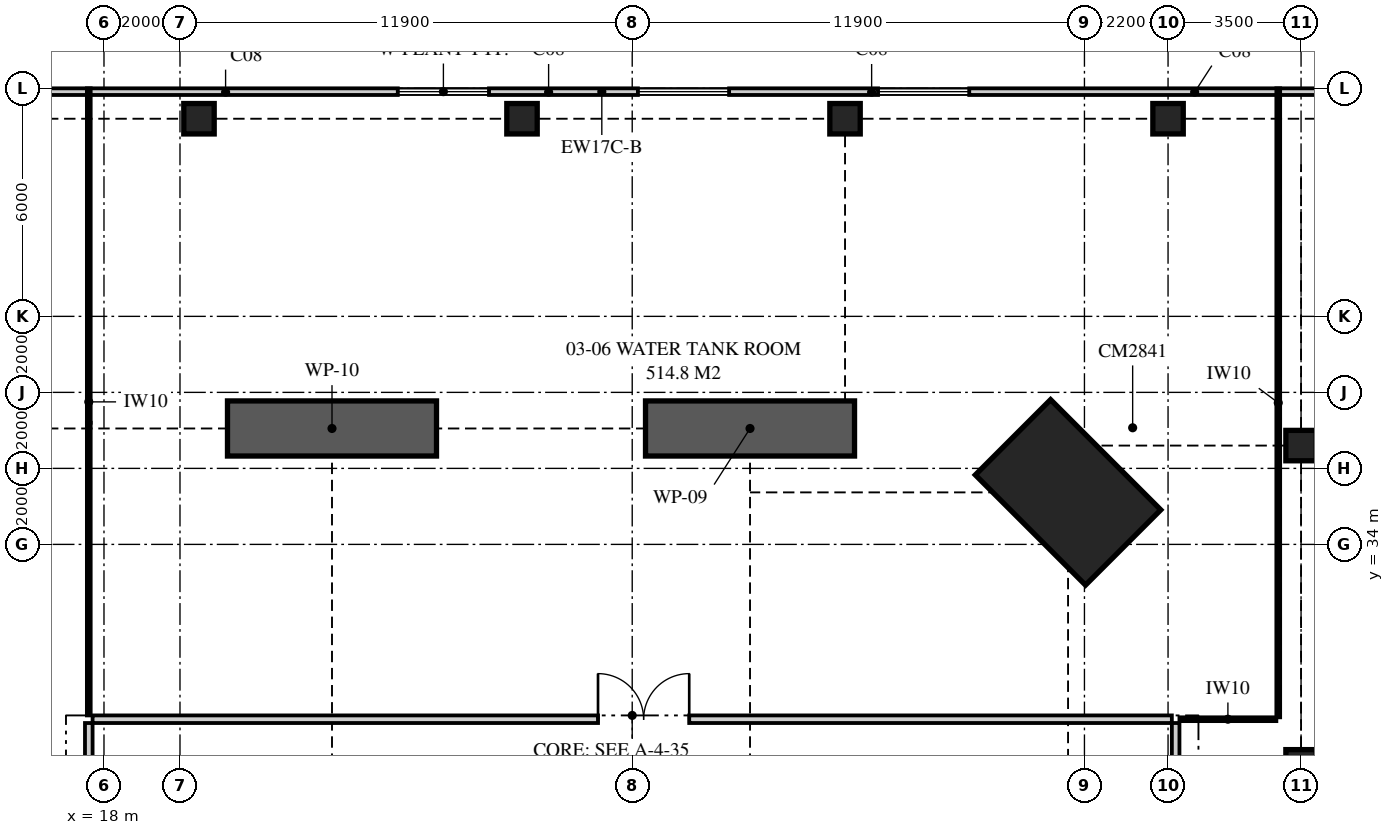
"""IFC4 building model, lengths in metres.
Left out: names, types, materials, properties, quantities, classifications, styles, units other than length and angle.
Written with IfcOpenShell. Run it as: python <this file> out.ifc"""

import sys

from ifc_helpers import new_model, si_unit, direction, frame, frame_2d, origin, origin_2d, place, context, subcontext, project, spatial, polyline, rectangle, outline, extrude, element, fill, save


model = new_model("IFC4")
c1 = context("Model", 3, precision=1e-05, world=origin(), true_north=direction((0.0, 1.0)))
c2 = subcontext(c1, "Body", "Model", "MODEL_VIEW")
j1 = project(units=[si_unit("LENGTHUNIT", "METRE"), si_unit("PLANEANGLEUNIT", "RADIAN")], contexts=[c1])
p1 = place(None, origin())
s1 = spatial("IfcSite", under=j1, at=p1, CompositionType="ELEMENT")
p2 = place(p1, origin())
s2 = spatial("IfcBuilding", under=s1, at=p2, CompositionType="ELEMENT")
p3 = place(p2, frame((0.0, 0.0, 16.0)))
s3 = spatial("IfcBuildingStorey", under=s2, at=p3, CompositionType="ELEMENT", Elevation=16.0)
p4 = place(p3, frame((43.369, 35.369, 0.0), z_axis=(0.0, 0.0, 1.0), x_axis=(-0.707106781187, -0.707106781187, 0.0)))
e1 = element("IfcColumn", 1, at=p4, inside=s3, PredefinedType="COLUMN", context=c2, shape_type="SweptSolid", body=[
    extrude(rectangle(XDim=2.8, YDim=4.1, at=origin_2d()), origin(), (0.0, 0.0, 1.0), 5.0),
])
for number, where, z_axis, x_axis in (
    (2, (49.5, 28.2, 0.0), (0.0, 0.0, 1.0), (1.0, 0.0, 0.0)),
    (3, (49.5, 36.6, 0.0), (0.0, 0.0, 1.0), (1.0, 0.0, 0.0)),
    (4, (20.5, 45.2, 0.0), (0.0, 0.0, 1.0), (1.0, 0.0, 0.0)),
    (5, (29.0, 45.2, 0.0), (0.0, 0.0, 1.0), (1.0, 0.0, 0.0)),
    (6, (37.5, 45.2, 0.0), (0.0, 0.0, 1.0), (1.0, 0.0, 0.0)),
    (7, (46.0, 45.2, 0.0), (0.0, 0.0, 1.0), (1.0, 0.0, 0.0)),
):
    element("IfcColumn", number, at=place(p3, frame(where, z_axis=z_axis, x_axis=x_axis)), inside=s3, PredefinedType="COLUMN", context=c2, shape_type="SweptSolid", body=[
        extrude(rectangle(XDim=0.8, YDim=0.8, at=origin_2d()), origin(), (0.0, 0.0, 1.0), 5.0),
    ])
p5 = place(p3, frame((59.2, 45.913, 0.0), z_axis=(0.0, 0.0, 1.0), x_axis=(-1.0, 0.0, 0.0)))
e8 = element("IfcWall", 8, at=p5, inside=s3, PredefinedType="SOLIDWALL", context=c2, shape_type="SweptSolid", body=[
    extrude(rectangle(XDim=56.2, YDim=0.175, at=frame_2d((28.1, 0.0))), origin(), (0.0, 0.0, 1.0), 4.12),
])
p6 = place(p5, frame((2.782, 0.0, 0.9)))
e9 = element("IfcOpeningElement", 9, at=p6, cuts=e8, PredefinedType="OPENING", context=c2, shape_type="SweptSolid", body=[
    extrude(rectangle(XDim=2.4, YDim=2.4, at=frame_2d((1.2, 1.2))), frame((0.0, 0.097, 0.0), z_axis=(0.0, -1.0, 0.0), x_axis=(1.0, 0.0, 0.0)), (0.0, 0.0, 1.0), 0.195),
])
p7 = place(p5, frame((18.431, 0.0, 0.9)))
e10 = element("IfcOpeningElement", 10, at=p7, cuts=e8, PredefinedType="OPENING", context=c2, shape_type="SweptSolid", body=[
    extrude(rectangle(XDim=2.4, YDim=2.4, at=frame_2d((1.2, 1.2))), frame((0.0, 0.097, 0.0), z_axis=(0.0, -1.0, 0.0), x_axis=(1.0, 0.0, 0.0)), (0.0, 0.0, 1.0), 0.195),
])
p8 = place(p5, frame((24.75, 0.0, 0.9)))
e11 = element("IfcOpeningElement", 11, at=p8, cuts=e8, PredefinedType="OPENING", context=c2, shape_type="SweptSolid", body=[
    extrude(rectangle(XDim=2.4, YDim=2.4, at=frame_2d((1.2, 1.2))), frame((0.0, 0.097, 0.0), z_axis=(0.0, -1.0, 0.0), x_axis=(1.0, 0.0, 0.0)), (0.0, 0.0, 1.0), 0.195),
])
p9 = place(p5, frame((31.069, 0.0, 0.9)))
e12 = element("IfcOpeningElement", 12, at=p9, cuts=e8, PredefinedType="OPENING", context=c2, shape_type="SweptSolid", body=[
    extrude(rectangle(XDim=2.4, YDim=2.4, at=frame_2d((1.2, 1.2))), frame((0.0, 0.097, 0.0), z_axis=(0.0, -1.0, 0.0), x_axis=(1.0, 0.0, 0.0)), (0.0, 0.0, 1.0), 0.195),
])
p10 = place(p5, frame((43.883, 0.0, 0.9)))
e13 = element("IfcOpeningElement", 13, at=p10, cuts=e8, PredefinedType="OPENING", context=c2, shape_type="SweptSolid", body=[
    extrude(rectangle(XDim=2.4, YDim=2.4, at=frame_2d((1.2, 1.2))), frame((0.0, 0.097, 0.0), z_axis=(0.0, -1.0, 0.0), x_axis=(1.0, 0.0, 0.0)), (0.0, 0.0, 1.0), 0.195),
])
p11 = place(p5, frame((50.748, 0.0, 0.9)))
e14 = element("IfcOpeningElement", 14, at=p11, cuts=e8, PredefinedType="OPENING", context=c2, shape_type="SweptSolid", body=[
    extrude(rectangle(XDim=2.4, YDim=2.4, at=frame_2d((1.2, 1.2))), frame((0.0, 0.097, 0.0), z_axis=(0.0, -1.0, 0.0), x_axis=(1.0, 0.0, 0.0)), (0.0, 0.0, 1.0), 0.195),
])
p12 = place(p3, frame((17.6, 27.75, 0.0), z_axis=(0.0, 0.0, 1.0), x_axis=(0.0, 1.0, 0.0)))
e15 = element("IfcWall", 15, at=p12, inside=s3, PredefinedType="PARTITIONING", context=c2, shape_type="SweptSolid", body=[
    extrude(rectangle(XDim=1.55, YDim=0.2, at=frame_2d((0.775, 0.0))), origin(), (0.0, 0.0, 1.0), 4.72),
])
p13 = place(p3, frame((17.6, 29.5, 0.0), z_axis=(0.0, 0.0, 1.0), x_axis=(0.0, 1.0, 0.0)))
e16 = element("IfcWall", 16, at=p13, inside=s3, PredefinedType="PARTITIONING", context=c2, shape_type="SweptSolid", body=[
    extrude(outline(polyline([(0.0, 0.0), (7.7, 0.0), (7.7, 4.72), (7.7, 4.12), (6.29, 4.12), (6.29, 4.72), (0.0, 4.72), (0.0, 0.0)])), frame((0.0, 0.05, 0.0), z_axis=(0.0, -1.0, 0.0), x_axis=(1.0, 0.0, 0.0)), (0.0, 0.0, 1.0), 0.1),
])
p14 = place(p3, frame((17.6, 37.2, 0.0), z_axis=(0.0, 0.0, 1.0), x_axis=(0.0, 1.0, 0.0)))
e17 = element("IfcWall", 17, at=p14, inside=s3, PredefinedType="PARTITIONING", context=c2, shape_type="SweptSolid", body=[
    extrude(outline(polyline([(0.0, 0.0), (8.8, 0.0), (8.8, 4.72), (8.8, 4.12), (6.74, 4.12), (6.74, 4.72), (1.11, 4.72), (1.11, 4.12), (0.0, 4.12), (0.0, 4.72), (0.0, 0.0)])), frame((0.0, 0.05, 0.0), z_axis=(0.0, -1.0, 0.0), x_axis=(1.0, 0.0, 0.0)), (0.0, 0.0, 1.0), 0.1),
])
p15 = place(p3, frame((17.7, 29.4, 0.0), z_axis=(0.0, 0.0, 1.0), x_axis=(1.0, 0.0, 0.0)))
e18 = element("IfcWall", 18, at=p15, inside=s3, PredefinedType="PARTITIONING", context=c2, shape_type="SweptSolid", body=[
    extrude(outline(polyline([(0.0, 0.0), (28.4, 0.0), (28.4, 4.72), (26.006, 4.72), (26.006, 4.151), (25.331, 4.151), (25.331, 4.72), (17.637, 4.72), (17.637, 4.151), (16.963, 4.151), (16.963, 4.72), (6.637, 4.72), (6.637, 4.151), (5.963, 4.151), (5.963, 4.72), (0.0, 4.72), (0.0, 0.0)])), frame((0.0, 0.1, 0.0), z_axis=(0.0, -1.0, 0.0), x_axis=(1.0, 0.0, 0.0)), (0.0, 0.0, 1.0), 0.2),
])
p16 = place(p15, frame((13.3, 0.0, 0.0)))
e19 = element("IfcOpeningElement", 19, at=p16, cuts=e18, PredefinedType="OPENING", context=c2, shape_type="SweptSolid", body=[
    extrude(rectangle(XDim=2.4, YDim=2.4, at=frame_2d((1.2, 1.2))), frame((0.0, 0.11, 0.0), z_axis=(0.0, -1.0, 0.0), x_axis=(1.0, 0.0, 0.0)), (0.0, 0.0, 1.0), 0.22),
])
p17 = place(p3, frame((46.2, 27.75, 0.0), z_axis=(0.0, 0.0, 1.0), x_axis=(0.0, 1.0, 0.0)))
e20 = element("IfcWall", 20, at=p17, inside=s3, PredefinedType="PARTITIONING", context=c2, shape_type="SweptSolid", body=[
    extrude(rectangle(XDim=1.55, YDim=0.2, at=frame_2d((0.775, 0.0))), origin(), (0.0, 0.0, 1.0), 4.72),
])
p18 = place(p3, frame((46.3, 29.4, 0.0), z_axis=(0.0, 0.0, 1.0), x_axis=(1.0, 0.0, 0.0)))
e21 = element("IfcWall", 21, at=p18, inside=s3, PredefinedType="PARTITIONING", context=c2, shape_type="SweptSolid", body=[
    extrude(outline(polyline([(0.0, 0.0), (2.55, 0.0), (2.55, 4.72), (2.55, 4.12), (1.94, 4.12), (1.94, 4.72), (0.0, 4.72), (0.0, 0.0)])), frame((0.0, 0.05, 0.0), z_axis=(0.0, -1.0, 0.0), x_axis=(1.0, 0.0, 0.0)), (0.0, 0.0, 1.0), 0.1),
])
p19 = place(p3, frame((48.9, 29.45, 0.0), z_axis=(0.0, 0.0, 1.0), x_axis=(0.0, 1.0, 0.0)))
e22 = element("IfcWall", 22, at=p19, inside=s3, PredefinedType="PARTITIONING", context=c2, shape_type="SweptSolid", body=[
    extrude(outline(polyline([(0.0, 0.0), (16.55, 0.0), (16.55, 4.72), (16.55, 4.12), (15.81, 4.12), (8.41, 4.12), (7.21, 4.12), (0.0, 4.12), (0.0, 4.72), (0.0, 0.0)])), frame((0.0, 0.05, 0.0), z_axis=(0.0, -1.0, 0.0), x_axis=(1.0, 0.0, 0.0)), (0.0, 0.0, 1.0), 0.1),
])
for number, where, z_axis, x_axis in (
    (23, (32.25, 37.05, 0.0), (0.0, 0.0, 1.0), (1.0, 0.0, 0.0)),
    (24, (21.25, 37.05, 0.0), (0.0, 0.0, 1.0), (1.0, 0.0, 0.0)),
):
    element("IfcWall", number, at=place(p3, frame(where, z_axis=z_axis, x_axis=x_axis)), inside=s3, PredefinedType="SHEAR", context=c2, shape_type="SweptSolid", body=[
        extrude(rectangle(XDim=5.5, YDim=1.45, at=frame_2d((2.75, 0.0))), origin(), (0.0, 0.0, 1.0), 5.0),
    ])
p20 = place(p7, origin())
e25 = element("IfcWindow", 25, at=p20, inside=s3, PartitioningType="SINGLE_PANEL", PredefinedType="WINDOW", context=c2, shape_type="SweptSolid", body=[
    extrude(rectangle(XDim=2.4, YDim=2.4, at=frame_2d((1.2, 1.2))), frame((0.0, 0.03, 0.0), z_axis=(0.0, -1.0, 0.0), x_axis=(1.0, 0.0, 0.0)), (0.0, 0.0, 1.0), 0.06),
])
fill(e10, e25)
p21 = place(p8, origin())
e26 = element("IfcWindow", 26, at=p21, inside=s3, PartitioningType="SINGLE_PANEL", PredefinedType="WINDOW", context=c2, shape_type="SweptSolid", body=[
    extrude(rectangle(XDim=2.4, YDim=2.4, at=frame_2d((1.2, 1.2))), frame((0.0, 0.03, 0.0), z_axis=(0.0, -1.0, 0.0), x_axis=(1.0, 0.0, 0.0)), (0.0, 0.0, 1.0), 0.06),
])
fill(e11, e26)
p22 = place(p9, origin())
e27 = element("IfcWindow", 27, at=p22, inside=s3, PartitioningType="SINGLE_PANEL", PredefinedType="WINDOW", context=c2, shape_type="SweptSolid", body=[
    extrude(rectangle(XDim=2.4, YDim=2.4, at=frame_2d((1.2, 1.2))), frame((0.0, 0.03, 0.0), z_axis=(0.0, -1.0, 0.0), x_axis=(1.0, 0.0, 0.0)), (0.0, 0.0, 1.0), 0.06),
])
fill(e12, e27)
p23 = place(p16, origin())
e28 = element("IfcDoor", 28, at=p23, inside=s3, OperationType="DOUBLE_DOOR_SINGLE_SWING", PredefinedType="DOOR", context=c2, shape_type="SweptSolid", body=[
    extrude(rectangle(XDim=2.4, YDim=2.4, at=frame_2d((1.2, 1.2))), frame((0.0, 0.025, 0.0), z_axis=(0.0, -1.0, 0.0), x_axis=(1.0, 0.0, 0.0)), (0.0, 0.0, 1.0), 0.05),
])
fill(e19, e28)
save(model, sys.argv[1])
